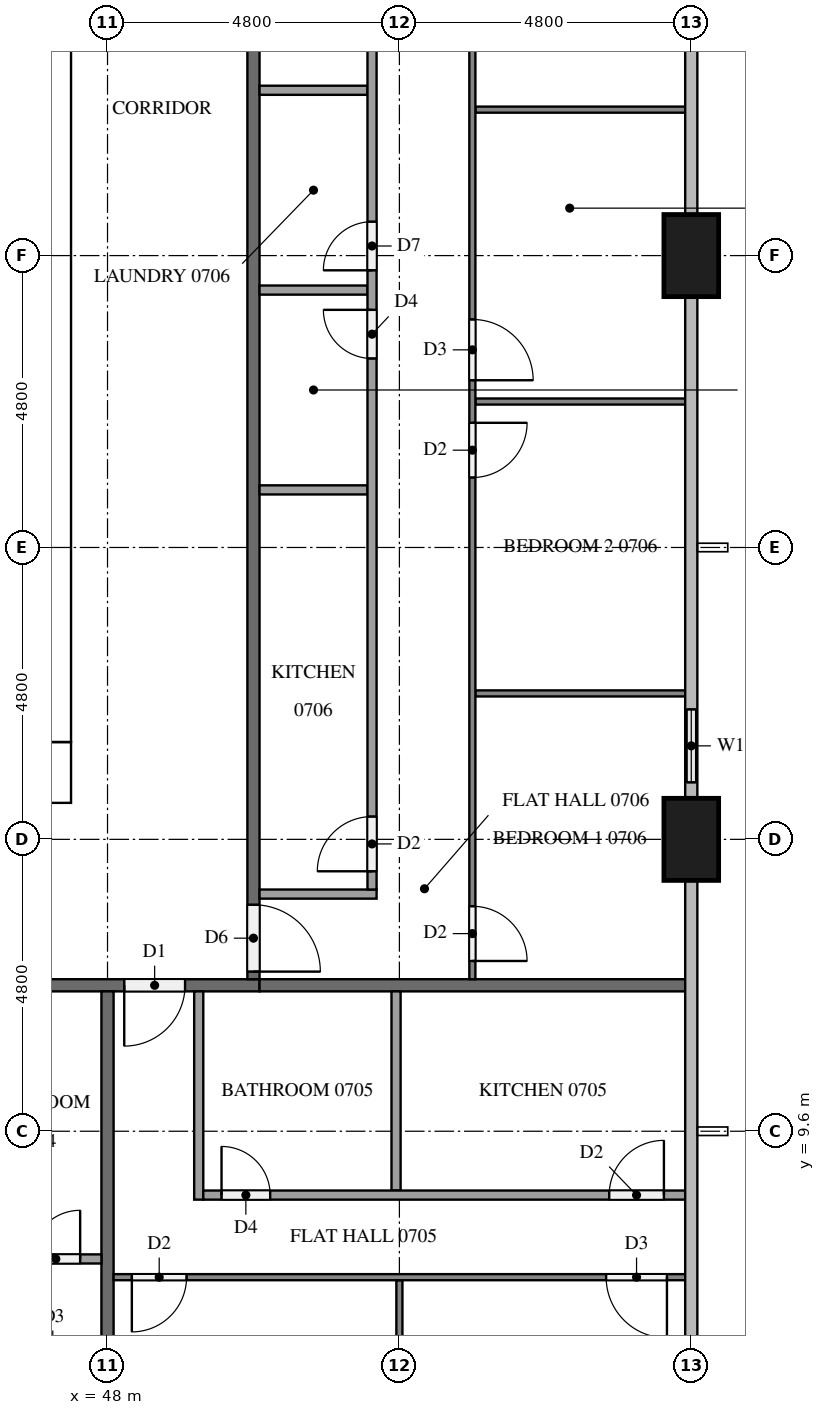
"""IFC4 building model, lengths in metres.
Left out: names, types, materials, properties, quantities, classifications, styles, units other than length and angle.
Written with IfcOpenShell. Run it as: python <this file> out.ifc"""

import sys

from ifc_helpers import new_model, si_unit, direction, frame, frame_2d, origin, origin_2d, place, context, subcontext, project, spatial, rectangle, extrude, element, fill, save


model = new_model("IFC4")
c1 = context("Model", 3, precision=1e-05, world=origin(), true_north=direction((0.0, 1.0)))
c2 = subcontext(c1, "Body", "Model", "MODEL_VIEW")
j1 = project(units=[si_unit("LENGTHUNIT", "METRE"), si_unit("PLANEANGLEUNIT", "RADIAN")], contexts=[c1])
p1 = place(None, origin())
s1 = spatial("IfcSite", under=j1, at=p1, CompositionType="ELEMENT")
p2 = place(p1, origin())
s2 = spatial("IfcBuilding", under=s1, at=p2, CompositionType="ELEMENT")
p3 = place(p2, frame((0.0, 0.0, 32.9)))
s3 = spatial("IfcBuildingStorey", under=s2, at=p3, CompositionType="ELEMENT", Elevation=32.9)
p4 = place(p3, frame((15.0, 15.5, 0.0), z_axis=(0.0, 0.0, 1.0), x_axis=(1.0, 0.0, 0.0)))
e1 = element("IfcWall", 1, at=p4, inside=s3, PredefinedType="SHEAR", context=c2, shape_type="SweptSolid", body=[
    extrude(rectangle(XDim=32.4, YDim=1.0, at=frame_2d((16.2, 0.0))), origin(), (0.0, 0.0, 1.0), 3.2),
])
p5 = place(p4, frame((15.3, 0.0, 0.0)))
e2 = element("IfcOpeningElement", 2, at=p5, cuts=e1, PredefinedType="OPENING", context=c2, shape_type="SweptSolid", body=[
    extrude(rectangle(XDim=1.8, YDim=2.1, at=frame_2d((0.9, 1.05))), frame((0.0, 0.51, 0.0), z_axis=(0.0, -1.0, 0.0), x_axis=(1.0, 0.0, 0.0)), (0.0, 0.0, 1.0), 1.02),
])
p6 = place(p3, frame((46.9, 16.0, 0.0), z_axis=(0.0, 0.0, 1.0), x_axis=(0.0, 1.0, 0.0)))
e3 = element("IfcWall", 3, at=p6, inside=s3, PredefinedType="SHEAR", context=c2, shape_type="SweptSolid", body=[
    extrude(rectangle(XDim=20.8, YDim=1.0, at=frame_2d((10.4, 0.0))), origin(), (0.0, 0.0, 1.0), 3.2),
])
p7 = place(p6, frame((10.1, 0.0, 0.0)))
e4 = element("IfcOpeningElement", 4, at=p7, cuts=e3, PredefinedType="OPENING", context=c2, shape_type="SweptSolid", body=[
    extrude(rectangle(XDim=1.2, YDim=2.1, at=frame_2d((0.6, 1.05))), frame((0.0, 0.51, 0.0), z_axis=(0.0, -1.0, 0.0), x_axis=(1.0, 0.0, 0.0)), (0.0, 0.0, 1.0), 1.02),
])
for number, where, z_axis, x_axis in (
    (5, (57.6, 14.4, 0.0), (0.0, 0.0, 1.0), (0.0, 1.0, 0.0)),
    (6, (57.6, 24.0, 0.0), (0.0, 0.0, 1.0), (0.0, 1.0, 0.0)),
):
    element("IfcColumn", number, at=place(p3, frame(where, z_axis=z_axis, x_axis=x_axis)), inside=s3, PredefinedType="COLUMN", context=c2, shape_type="SweptSolid", body=[
        extrude(rectangle(XDim=1.35, YDim=0.9, at=origin_2d()), origin(), (0.0, 0.0, 1.0), 3.2),
    ])
p8 = place(p3, frame((57.6, 15.075, 0.0), z_axis=(0.0, 0.0, 1.0), x_axis=(0.0, 1.0, 0.0)))
e7 = element("IfcWall", 7, at=p8, inside=s3, PredefinedType="SOLIDWALL", context=c2, shape_type="SweptSolid", body=[
    extrude(rectangle(XDim=1.725, YDim=0.15, at=frame_2d((0.863, 0.0))), origin(), (0.0, 0.0, 1.0), 3.2),
])
p9 = place(p8, frame((0.262, 0.0, 0.9)))
e8 = element("IfcOpeningElement", 8, at=p9, cuts=e7, PredefinedType="OPENING", context=c2, shape_type="SweptSolid", body=[
    extrude(rectangle(XDim=1.2, YDim=1.4, at=frame_2d((0.6, 0.7))), frame((0.0, 0.085, 0.0), z_axis=(0.0, -1.0, 0.0), x_axis=(1.0, 0.0, 0.0)), (0.0, 0.0, 1.0), 0.17),
])
p10 = place(p3, frame((50.5, 12.0, 0.0), z_axis=(0.0, 0.0, 1.0), x_axis=(-1.0, 0.0, 0.0)))
e9 = element("IfcWall", 9, at=p10, inside=s3, PredefinedType="PARTITIONING", context=c2, shape_type="SweptSolid", body=[
    extrude(rectangle(XDim=38.6, YDim=0.2, at=frame_2d((19.3, 0.0))), origin(), (0.0, 0.0, 1.0), 3.2),
])
p11 = place(p10, frame((36.375, 0.0, 0.0)))
e10 = element("IfcOpeningElement", 10, at=p11, cuts=e9, PredefinedType="OPENING", context=c2, shape_type="SweptSolid", body=[
    extrude(rectangle(XDim=1.0, YDim=2.1, at=frame_2d((0.5, 1.05))), frame((0.0, 0.11, 0.0), z_axis=(0.0, -1.0, 0.0), x_axis=(1.0, 0.0, 0.0)), (0.0, 0.0, 1.0), 0.22),
])
p12 = place(p10, frame((34.825, 0.0, 0.0)))
e11 = element("IfcOpeningElement", 11, at=p12, cuts=e9, PredefinedType="OPENING", context=c2, shape_type="SweptSolid", body=[
    extrude(rectangle(XDim=1.0, YDim=2.1, at=frame_2d((0.5, 1.05))), frame((0.0, 0.11, 0.0), z_axis=(0.0, -1.0, 0.0), x_axis=(1.0, 0.0, 0.0)), (0.0, 0.0, 1.0), 0.22),
])
p13 = place(p10, frame((22.825, 0.0, 0.0)))
e12 = element("IfcOpeningElement", 12, at=p13, cuts=e9, PredefinedType="OPENING", context=c2, shape_type="SweptSolid", body=[
    extrude(rectangle(XDim=1.0, YDim=2.1, at=frame_2d((0.5, 1.05))), frame((0.0, 0.11, 0.0), z_axis=(0.0, -1.0, 0.0), x_axis=(1.0, 0.0, 0.0)), (0.0, 0.0, 1.0), 0.22),
])
p14 = place(p10, frame((8.425, 0.0, 0.0)))
e13 = element("IfcOpeningElement", 13, at=p14, cuts=e9, PredefinedType="OPENING", context=c2, shape_type="SweptSolid", body=[
    extrude(rectangle(XDim=1.0, YDim=2.1, at=frame_2d((0.5, 1.05))), frame((0.0, 0.11, 0.0), z_axis=(0.0, -1.0, 0.0), x_axis=(1.0, 0.0, 0.0)), (0.0, 0.0, 1.0), 0.22),
])
p15 = place(p10, frame((1.225, 0.0, 0.0)))
e14 = element("IfcOpeningElement", 14, at=p15, cuts=e9, PredefinedType="OPENING", context=c2, shape_type="SweptSolid", body=[
    extrude(rectangle(XDim=1.0, YDim=2.1, at=frame_2d((0.5, 1.05))), frame((0.0, 0.11, 0.0), z_axis=(0.0, -1.0, 0.0), x_axis=(1.0, 0.0, 0.0)), (0.0, 0.0, 1.0), 0.22),
])
p16 = place(p3, frame((50.4, 40.7, 0.0), z_axis=(0.0, 0.0, 1.0), x_axis=(0.0, -1.0, 0.0)))
e15 = element("IfcWall", 15, at=p16, inside=s3, PredefinedType="PARTITIONING", context=c2, shape_type="SweptSolid", body=[
    extrude(rectangle(XDim=28.6, YDim=0.2, at=frame_2d((14.3, 0.0))), origin(), (0.0, 0.0, 1.0), 3.2),
])
p17 = place(p16, frame((27.375, 0.0, 0.0)))
e16 = element("IfcOpeningElement", 16, at=p17, cuts=e15, PredefinedType="OPENING", context=c2, shape_type="SweptSolid", body=[
    extrude(rectangle(XDim=1.1, YDim=2.1, at=frame_2d((0.55, 1.05))), frame((0.0, 0.11, 0.0), z_axis=(0.0, -1.0, 0.0), x_axis=(1.0, 0.0, 0.0)), (0.0, 0.0, 1.0), 0.22),
])
p18 = place(p16, frame((8.225, 0.0, 0.0)))
e17 = element("IfcOpeningElement", 17, at=p18, cuts=e15, PredefinedType="OPENING", context=c2, shape_type="SweptSolid", body=[
    extrude(rectangle(XDim=1.0, YDim=2.1, at=frame_2d((0.5, 1.05))), frame((0.0, 0.11, 0.0), z_axis=(0.0, -1.0, 0.0), x_axis=(1.0, 0.0, 0.0)), (0.0, 0.0, 1.0), 0.22),
])
p19 = place(p3, frame((48.0, 11.9, 0.0), z_axis=(0.0, 0.0, 1.0), x_axis=(0.0, -1.0, 0.0)))
e18 = element("IfcWall", 18, at=p19, inside=s3, PredefinedType="PARTITIONING", context=c2, shape_type="SweptSolid", body=[
    extrude(rectangle(XDim=11.8, YDim=0.2, at=frame_2d((5.9, 0.0))), origin(), (0.0, 0.0, 1.0), 3.2),
])
p20 = place(p3, frame((50.5, 12.0, 0.0), z_axis=(0.0, 0.0, 1.0), x_axis=(1.0, 0.0, 0.0)))
e19 = element("IfcWall", 19, at=p20, inside=s3, PredefinedType="PARTITIONING", context=c2, shape_type="SweptSolid", body=[
    extrude(rectangle(XDim=7.0, YDim=0.2, at=frame_2d((3.5, 0.0))), origin(), (0.0, 0.0, 1.0), 3.2),
])
p21 = place(p3, frame((42.375, 7.5, 0.0), z_axis=(0.0, 0.0, 1.0), x_axis=(1.0, 0.0, 0.0)))
e20 = element("IfcWall", 20, at=p21, inside=s3, PredefinedType="PARTITIONING", context=c2, shape_type="SweptSolid", body=[
    extrude(rectangle(XDim=5.525, YDim=0.15, at=frame_2d((2.762, 0.0))), origin(), (0.0, 0.0, 1.0), 3.2),
])
p22 = place(p21, frame((0.3, 0.0, 0.0)))
e21 = element("IfcOpeningElement", 21, at=p22, cuts=e20, PredefinedType="OPENING", context=c2, shape_type="SweptSolid", body=[
    extrude(rectangle(XDim=0.9, YDim=2.1, at=frame_2d((0.45, 1.05))), frame((0.0, 0.085, 0.0), z_axis=(0.0, -1.0, 0.0), x_axis=(1.0, 0.0, 0.0)), (0.0, 0.0, 1.0), 0.17),
])
p23 = place(p21, frame((4.375, 0.0, 0.0)))
e22 = element("IfcOpeningElement", 22, at=p23, cuts=e20, PredefinedType="OPENING", context=c2, shape_type="SweptSolid", body=[
    extrude(rectangle(XDim=0.8, YDim=2.1, at=frame_2d((0.4, 1.05))), frame((0.0, 0.085, 0.0), z_axis=(0.0, -1.0, 0.0), x_axis=(1.0, 0.0, 0.0)), (0.0, 0.0, 1.0), 0.17),
])
p24 = place(p3, frame((52.8, 7.15, 0.0), z_axis=(0.0, 0.0, 1.0), x_axis=(0.0, -1.0, 0.0)))
e23 = element("IfcWall", 23, at=p24, inside=s3, PredefinedType="PARTITIONING", context=c2, shape_type="SweptSolid", body=[
    extrude(rectangle(XDim=6.525, YDim=0.1, at=frame_2d((3.262, 0.0))), origin(), (0.0, 0.0, 1.0), 3.2),
])
p25 = place(p3, frame((57.5, 7.2, 0.0), z_axis=(0.0, 0.0, 1.0), x_axis=(-1.0, 0.0, 0.0)))
e24 = element("IfcWall", 24, at=p25, inside=s3, PredefinedType="PARTITIONING", context=c2, shape_type="SweptSolid", body=[
    extrude(rectangle(XDim=9.4, YDim=0.1, at=frame_2d((4.7, 0.0))), origin(), (0.0, 0.0, 1.0), 3.2),
])
p26 = place(p25, frame((8.2, 0.0, 0.0)))
e25 = element("IfcOpeningElement", 25, at=p26, cuts=e24, PredefinedType="OPENING", context=c2, shape_type="SweptSolid", body=[
    extrude(rectangle(XDim=0.9, YDim=2.1, at=frame_2d((0.45, 1.05))), frame((0.0, 0.06, 0.0), z_axis=(0.0, -1.0, 0.0), x_axis=(1.0, 0.0, 0.0)), (0.0, 0.0, 1.0), 0.12),
])
p27 = place(p25, frame((0.3, 0.0, 0.0)))
e26 = element("IfcOpeningElement", 26, at=p27, cuts=e24, PredefinedType="OPENING", context=c2, shape_type="SweptSolid", body=[
    extrude(rectangle(XDim=1.0, YDim=2.1, at=frame_2d((0.5, 1.05))), frame((0.0, 0.06, 0.0), z_axis=(0.0, -1.0, 0.0), x_axis=(1.0, 0.0, 0.0)), (0.0, 0.0, 1.0), 0.12),
])
p28 = place(p3, frame((52.745, 11.9, 0.0), z_axis=(0.0, 0.0, 1.0), x_axis=(0.0, -1.0, 0.0)))
e27 = element("IfcWall", 27, at=p28, inside=s3, PredefinedType="PARTITIONING", context=c2, shape_type="SweptSolid", body=[
    extrude(rectangle(XDim=3.275, YDim=0.15, at=frame_2d((1.637, 0.0))), origin(), (0.0, 0.0, 1.0), 3.2),
])
p29 = place(p3, frame((49.5, 11.9, 0.0), z_axis=(0.0, 0.0, 1.0), x_axis=(0.0, -1.0, 0.0)))
e28 = element("IfcWall", 28, at=p29, inside=s3, PredefinedType="PARTITIONING", context=c2, shape_type="SweptSolid", body=[
    extrude(rectangle(XDim=3.425, YDim=0.15, at=frame_2d((1.712, 0.0))), origin(), (0.0, 0.0, 1.0), 3.2),
])
p30 = place(p3, frame((49.575, 8.55, 0.0), z_axis=(0.0, 0.0, 1.0), x_axis=(1.0, 0.0, 0.0)))
e29 = element("IfcWall", 29, at=p30, inside=s3, PredefinedType="PARTITIONING", context=c2, shape_type="SweptSolid", body=[
    extrude(rectangle(XDim=7.925, YDim=0.15, at=frame_2d((3.962, 0.0))), origin(), (0.0, 0.0, 1.0), 3.2),
])
p31 = place(p30, frame((0.3, 0.0, 0.0)))
e30 = element("IfcOpeningElement", 30, at=p31, cuts=e29, PredefinedType="OPENING", context=c2, shape_type="SweptSolid", body=[
    extrude(rectangle(XDim=0.8, YDim=2.1, at=frame_2d((0.4, 1.05))), frame((0.0, 0.085, 0.0), z_axis=(0.0, -1.0, 0.0), x_axis=(1.0, 0.0, 0.0)), (0.0, 0.0, 1.0), 0.17),
])
p32 = place(p30, frame((6.675, 0.0, 0.0)))
e31 = element("IfcOpeningElement", 31, at=p32, cuts=e29, PredefinedType="OPENING", context=c2, shape_type="SweptSolid", body=[
    extrude(rectangle(XDim=0.9, YDim=2.1, at=frame_2d((0.45, 1.05))), frame((0.0, 0.085, 0.0), z_axis=(0.0, -1.0, 0.0), x_axis=(1.0, 0.0, 0.0)), (0.0, 0.0, 1.0), 0.17),
])
for number, where, z_axis, x_axis in (
    (32, (54.05, 16.8, 0.0), (0.0, 0.0, 1.0), (1.0, 0.0, 0.0)),
    (33, (54.05, 21.6, 0.0), (0.0, 0.0, 1.0), (1.0, 0.0, 0.0)),
    (34, (54.05, 26.4, 0.0), (0.0, 0.0, 1.0), (1.0, 0.0, 0.0)),
):
    element("IfcWall", number, at=place(p3, frame(where, z_axis=z_axis, x_axis=x_axis)), inside=s3, PredefinedType="PARTITIONING", context=c2, shape_type="SweptSolid", body=[
        extrude(rectangle(XDim=3.45, YDim=0.1, at=frame_2d((1.725, 0.0))), origin(), (0.0, 0.0, 1.0), 3.2),
    ])
p33 = place(p3, frame((54.0, 31.1, 0.0), z_axis=(0.0, 0.0, 1.0), x_axis=(0.0, -1.0, 0.0)))
e35 = element("IfcWall", 35, at=p33, inside=s3, PredefinedType="PARTITIONING", context=c2, shape_type="SweptSolid", body=[
    extrude(rectangle(XDim=19.0, YDim=0.1, at=frame_2d((9.5, 0.0))), origin(), (0.0, 0.0, 1.0), 3.2),
])
p34 = place(p33, frame((17.8, 0.0, 0.0)))
e36 = element("IfcOpeningElement", 36, at=p34, cuts=e35, PredefinedType="OPENING", context=c2, shape_type="SweptSolid", body=[
    extrude(rectangle(XDim=0.9, YDim=2.1, at=frame_2d((0.45, 1.05))), frame((0.0, 0.06, 0.0), z_axis=(0.0, -1.0, 0.0), x_axis=(1.0, 0.0, 0.0)), (0.0, 0.0, 1.0), 0.12),
])
p35 = place(p33, frame((9.85, 0.0, 0.0)))
e37 = element("IfcOpeningElement", 37, at=p35, cuts=e35, PredefinedType="OPENING", context=c2, shape_type="SweptSolid", body=[
    extrude(rectangle(XDim=0.9, YDim=2.1, at=frame_2d((0.45, 1.05))), frame((0.0, 0.06, 0.0), z_axis=(0.0, -1.0, 0.0), x_axis=(1.0, 0.0, 0.0)), (0.0, 0.0, 1.0), 0.12),
])
p36 = place(p33, frame((8.15, 0.0, 0.0)))
e38 = element("IfcOpeningElement", 38, at=p36, cuts=e35, PredefinedType="OPENING", context=c2, shape_type="SweptSolid", body=[
    extrude(rectangle(XDim=1.0, YDim=2.1, at=frame_2d((0.5, 1.05))), frame((0.0, 0.06, 0.0), z_axis=(0.0, -1.0, 0.0), x_axis=(1.0, 0.0, 0.0)), (0.0, 0.0, 1.0), 0.12),
])
p37 = place(p33, frame((0.3, 0.0, 0.0)))
e39 = element("IfcOpeningElement", 39, at=p37, cuts=e35, PredefinedType="OPENING", context=c2, shape_type="SweptSolid", body=[
    extrude(rectangle(XDim=0.9, YDim=2.1, at=frame_2d((0.45, 1.05))), frame((0.0, 0.06, 0.0), z_axis=(0.0, -1.0, 0.0), x_axis=(1.0, 0.0, 0.0)), (0.0, 0.0, 1.0), 0.12),
])
for number, where, z_axis, x_axis in (
    (40, (50.5, 20.147, 0.0), (0.0, 0.0, 1.0), (1.0, 0.0, 0.0)),
    (41, (50.5, 23.433, 0.0), (0.0, 0.0, 1.0), (1.0, 0.0, 0.0)),
    (42, (50.5, 26.719, 0.0), (0.0, 0.0, 1.0), (1.0, 0.0, 0.0)),
):
    element("IfcWall", number, at=place(p3, frame(where, z_axis=z_axis, x_axis=x_axis)), inside=s3, PredefinedType="PARTITIONING", context=c2, shape_type="SweptSolid", body=[
        extrude(rectangle(XDim=1.775, YDim=0.15, at=frame_2d((0.887, 0.0))), origin(), (0.0, 0.0, 1.0), 3.2),
    ])
p38 = place(p3, frame((50.5, 13.5, 0.0), z_axis=(0.0, 0.0, 1.0), x_axis=(1.0, 0.0, 0.0)))
e43 = element("IfcWall", 43, at=p38, inside=s3, PredefinedType="PARTITIONING", context=c2, shape_type="SweptSolid", body=[
    extrude(rectangle(XDim=1.925, YDim=0.15, at=frame_2d((0.962, 0.0))), origin(), (0.0, 0.0, 1.0), 3.2),
])
p39 = place(p3, frame((52.35, 13.575, 0.0), z_axis=(0.0, 0.0, 1.0), x_axis=(0.0, 1.0, 0.0)))
e44 = element("IfcWall", 44, at=p39, inside=s3, PredefinedType="PARTITIONING", context=c2, shape_type="SweptSolid", body=[
    extrude(rectangle(XDim=17.525, YDim=0.15, at=frame_2d((8.763, 0.0))), origin(), (0.0, 0.0, 1.0), 3.2),
])
p40 = place(p39, frame((0.3, 0.0, 0.0)))
e45 = element("IfcOpeningElement", 45, at=p40, cuts=e44, PredefinedType="OPENING", context=c2, shape_type="SweptSolid", body=[
    extrude(rectangle(XDim=0.9, YDim=2.1, at=frame_2d((0.45, 1.05))), frame((0.0, 0.085, 0.0), z_axis=(0.0, -1.0, 0.0), x_axis=(1.0, 0.0, 0.0)), (0.0, 0.0, 1.0), 0.17),
])
p41 = place(p39, frame((8.733, 0.0, 0.0)))
e46 = element("IfcOpeningElement", 46, at=p41, cuts=e44, PredefinedType="OPENING", context=c2, shape_type="SweptSolid", body=[
    extrude(rectangle(XDim=0.8, YDim=2.1, at=frame_2d((0.4, 1.05))), frame((0.0, 0.085, 0.0), z_axis=(0.0, -1.0, 0.0), x_axis=(1.0, 0.0, 0.0)), (0.0, 0.0, 1.0), 0.17),
])
p42 = place(p39, frame((10.183, 0.0, 0.0)))
e47 = element("IfcOpeningElement", 47, at=p42, cuts=e44, PredefinedType="OPENING", context=c2, shape_type="SweptSolid", body=[
    extrude(rectangle(XDim=0.8, YDim=2.1, at=frame_2d((0.4, 1.05))), frame((0.0, 0.085, 0.0), z_axis=(0.0, -1.0, 0.0), x_axis=(1.0, 0.0, 0.0)), (0.0, 0.0, 1.0), 0.17),
])
p43 = place(p39, frame((16.275, 0.0, 0.0)))
e48 = element("IfcOpeningElement", 48, at=p43, cuts=e44, PredefinedType="OPENING", context=c2, shape_type="SweptSolid", body=[
    extrude(rectangle(XDim=0.9, YDim=2.1, at=frame_2d((0.45, 1.05))), frame((0.0, 0.085, 0.0), z_axis=(0.0, -1.0, 0.0), x_axis=(1.0, 0.0, 0.0)), (0.0, 0.0, 1.0), 0.17),
])
p44 = place(p9, origin())
e49 = element("IfcWindow", 49, at=p44, inside=s3, PartitioningType="SINGLE_PANEL", PredefinedType="WINDOW", context=c2, shape_type="SweptSolid", body=[
    extrude(rectangle(XDim=1.2, YDim=1.4, at=frame_2d((0.6, 0.7))), frame((0.0, 0.03, 0.0), z_axis=(0.0, -1.0, 0.0), x_axis=(1.0, 0.0, 0.0)), (0.0, 0.0, 1.0), 0.06),
])
fill(e8, e49)
p45 = place(p15, origin())
e50 = element("IfcDoor", 50, at=p45, inside=s3, OperationType="SINGLE_SWING_RIGHT", PredefinedType="DOOR", context=c2, shape_type="SweptSolid", body=[
    extrude(rectangle(XDim=1.0, YDim=2.1, at=frame_2d((0.5, 1.05))), frame((0.0, 0.025, 0.0), z_axis=(0.0, -1.0, 0.0), x_axis=(1.0, 0.0, 0.0)), (0.0, 0.0, 1.0), 0.05),
])
fill(e14, e50)
p46 = place(p17, origin())
e51 = element("IfcDoor", 51, at=p46, inside=s3, OperationType="SINGLE_SWING_RIGHT", PredefinedType="DOOR", context=c2, shape_type="SweptSolid", body=[
    extrude(rectangle(XDim=1.1, YDim=2.1, at=frame_2d((0.55, 1.05))), frame((0.0, 0.025, 0.0), z_axis=(0.0, -1.0, 0.0), x_axis=(1.0, 0.0, 0.0)), (0.0, 0.0, 1.0), 0.05),
])
fill(e16, e51)
p47 = place(p23, origin())
e52 = element("IfcDoor", 52, at=p47, inside=s3, OperationType="SINGLE_SWING_RIGHT", PredefinedType="DOOR", context=c2, shape_type="SweptSolid", body=[
    extrude(rectangle(XDim=0.8, YDim=2.1, at=frame_2d((0.4, 1.05))), frame((0.0, 0.025, 0.0), z_axis=(0.0, -1.0, 0.0), x_axis=(1.0, 0.0, 0.0)), (0.0, 0.0, 1.0), 0.05),
])
fill(e22, e52)
p48 = place(p26, origin())
e53 = element("IfcDoor", 53, at=p48, inside=s3, OperationType="SINGLE_SWING_RIGHT", PredefinedType="DOOR", context=c2, shape_type="SweptSolid", body=[
    extrude(rectangle(XDim=0.9, YDim=2.1, at=frame_2d((0.45, 1.05))), frame((0.0, 0.025, 0.0), z_axis=(0.0, -1.0, 0.0), x_axis=(1.0, 0.0, 0.0)), (0.0, 0.0, 1.0), 0.05),
])
fill(e25, e53)
p49 = place(p27, origin())
e54 = element("IfcDoor", 54, at=p49, inside=s3, OperationType="SINGLE_SWING_LEFT", PredefinedType="DOOR", context=c2, shape_type="SweptSolid", body=[
    extrude(rectangle(XDim=1.0, YDim=2.1, at=frame_2d((0.5, 1.05))), frame((0.0, 0.025, 0.0), z_axis=(0.0, -1.0, 0.0), x_axis=(1.0, 0.0, 0.0)), (0.0, 0.0, 1.0), 0.05),
])
fill(e26, e54)
p50 = place(p31, origin())
e55 = element("IfcDoor", 55, at=p50, inside=s3, OperationType="SINGLE_SWING_LEFT", PredefinedType="DOOR", context=c2, shape_type="SweptSolid", body=[
    extrude(rectangle(XDim=0.8, YDim=2.1, at=frame_2d((0.4, 1.05))), frame((0.0, 0.025, 0.0), z_axis=(0.0, -1.0, 0.0), x_axis=(1.0, 0.0, 0.0)), (0.0, 0.0, 1.0), 0.05),
])
fill(e30, e55)
p51 = place(p32, origin())
e56 = element("IfcDoor", 56, at=p51, inside=s3, OperationType="SINGLE_SWING_RIGHT", PredefinedType="DOOR", context=c2, shape_type="SweptSolid", body=[
    extrude(rectangle(XDim=0.9, YDim=2.1, at=frame_2d((0.45, 1.05))), frame((0.0, 0.025, 0.0), z_axis=(0.0, -1.0, 0.0), x_axis=(1.0, 0.0, 0.0)), (0.0, 0.0, 1.0), 0.05),
])
fill(e31, e56)
p52 = place(p34, origin())
e57 = element("IfcDoor", 57, at=p52, inside=s3, OperationType="SINGLE_SWING_RIGHT", PredefinedType="DOOR", context=c2, shape_type="SweptSolid", body=[
    extrude(rectangle(XDim=0.9, YDim=2.1, at=frame_2d((0.45, 1.05))), frame((0.0, 0.025, 0.0), z_axis=(0.0, -1.0, 0.0), x_axis=(1.0, 0.0, 0.0)), (0.0, 0.0, 1.0), 0.05),
])
fill(e36, e57)
p53 = place(p35, origin())
e58 = element("IfcDoor", 58, at=p53, inside=s3, OperationType="SINGLE_SWING_LEFT", PredefinedType="DOOR", context=c2, shape_type="SweptSolid", body=[
    extrude(rectangle(XDim=0.9, YDim=2.1, at=frame_2d((0.45, 1.05))), frame((0.0, 0.025, 0.0), z_axis=(0.0, -1.0, 0.0), x_axis=(1.0, 0.0, 0.0)), (0.0, 0.0, 1.0), 0.05),
])
fill(e37, e58)
p54 = place(p36, origin())
e59 = element("IfcDoor", 59, at=p54, inside=s3, OperationType="SINGLE_SWING_RIGHT", PredefinedType="DOOR", context=c2, shape_type="SweptSolid", body=[
    extrude(rectangle(XDim=1.0, YDim=2.1, at=frame_2d((0.5, 1.05))), frame((0.0, 0.025, 0.0), z_axis=(0.0, -1.0, 0.0), x_axis=(1.0, 0.0, 0.0)), (0.0, 0.0, 1.0), 0.05),
])
fill(e38, e59)
p55 = place(p40, origin())
e60 = element("IfcDoor", 60, at=p55, inside=s3, OperationType="SINGLE_SWING_LEFT", PredefinedType="DOOR", context=c2, shape_type="SweptSolid", body=[
    extrude(rectangle(XDim=0.9, YDim=2.1, at=frame_2d((0.45, 1.05))), frame((0.0, 0.025, 0.0), z_axis=(0.0, -1.0, 0.0), x_axis=(1.0, 0.0, 0.0)), (0.0, 0.0, 1.0), 0.05),
])
fill(e45, e60)
p56 = place(p41, origin())
e61 = element("IfcDoor", 61, at=p56, inside=s3, OperationType="SINGLE_SWING_RIGHT", PredefinedType="DOOR", context=c2, shape_type="SweptSolid", body=[
    extrude(rectangle(XDim=0.8, YDim=2.1, at=frame_2d((0.4, 1.05))), frame((0.0, 0.025, 0.0), z_axis=(0.0, -1.0, 0.0), x_axis=(1.0, 0.0, 0.0)), (0.0, 0.0, 1.0), 0.05),
])
fill(e46, e61)
p57 = place(p42, origin())
e62 = element("IfcDoor", 62, at=p57, inside=s3, OperationType="SINGLE_SWING_LEFT", PredefinedType="DOOR", context=c2, shape_type="SweptSolid", body=[
    extrude(rectangle(XDim=0.8, YDim=2.1, at=frame_2d((0.4, 1.05))), frame((0.0, 0.025, 0.0), z_axis=(0.0, -1.0, 0.0), x_axis=(1.0, 0.0, 0.0)), (0.0, 0.0, 1.0), 0.05),
])
fill(e47, e62)
save(model, sys.argv[1])
